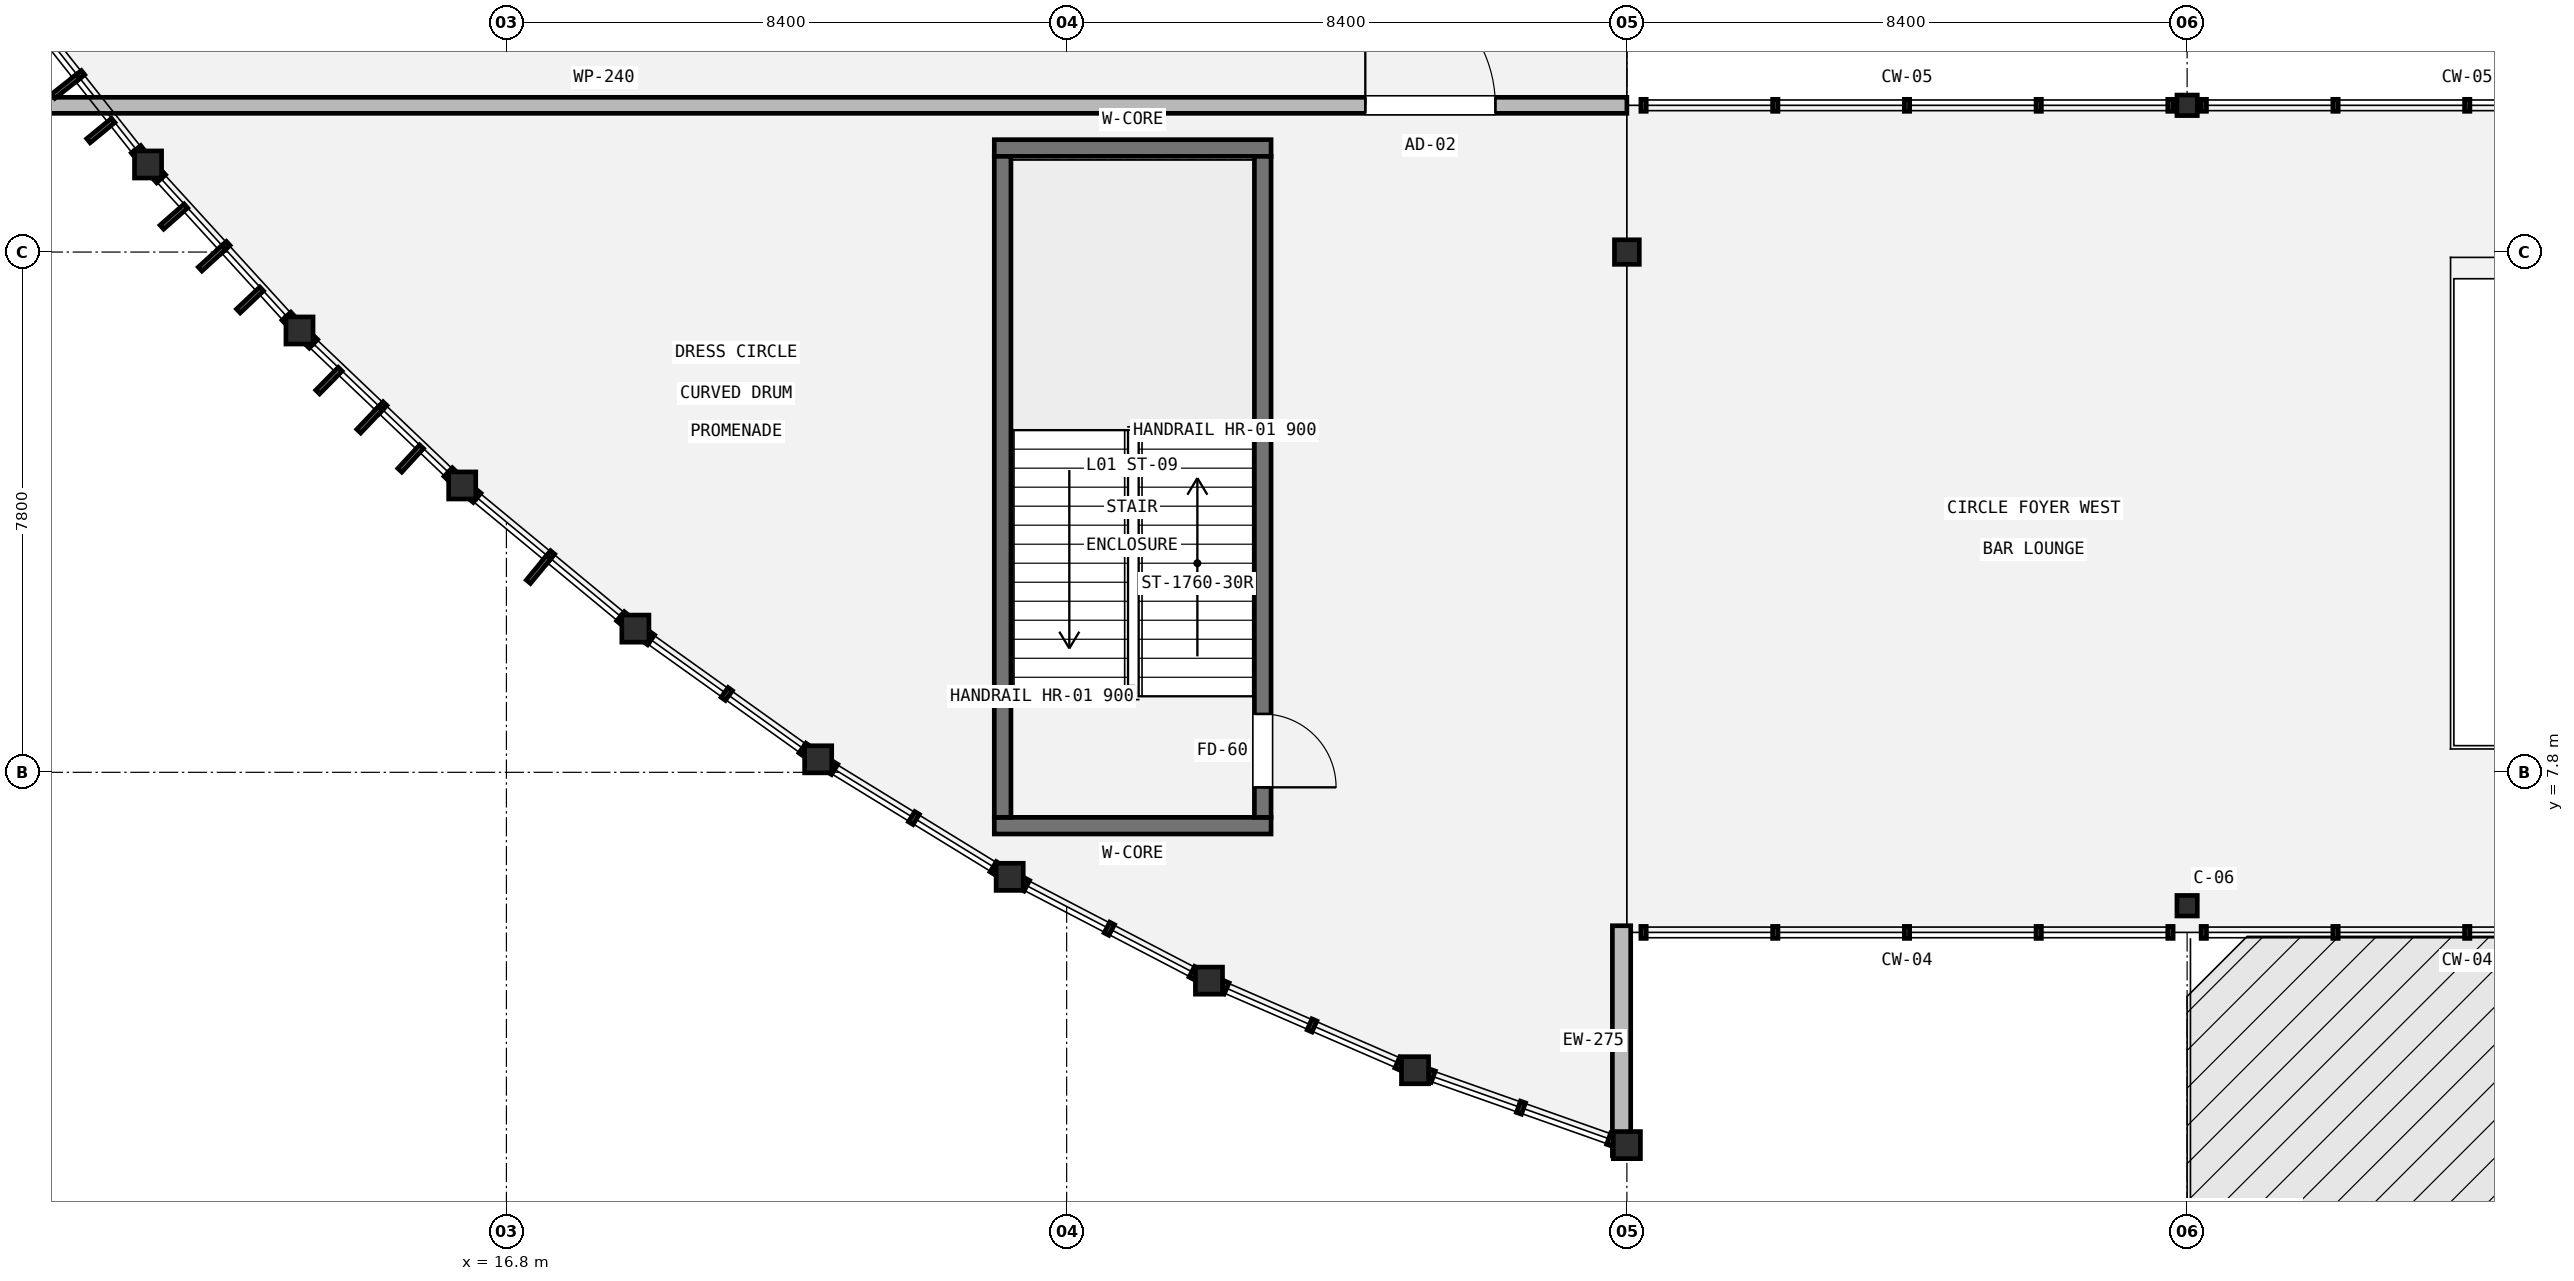
"""IFC4 building model, lengths in metres.
Left out: names, types, materials, properties, quantities, classifications, styles, units other than length and angle.
Written with IfcOpenShell. Run it as: python <this file> out.ifc"""

import sys

from ifc_helpers import new_model, si_unit, direction, frame, frame_2d, origin, origin_2d, place, context, subcontext, project, spatial, rectangle, hollow_circle, i_section, extrude, element, fill, save


model = new_model("IFC4")
c1 = context("Model", 3, precision=1e-05, world=origin(), true_north=direction((0.0, 1.0)))
c2 = subcontext(c1, "Body", "Model", "MODEL_VIEW")
j1 = project(units=[si_unit("LENGTHUNIT", "METRE"), si_unit("PLANEANGLEUNIT", "RADIAN")], contexts=[c1])
p1 = place(None, origin())
s1 = spatial("IfcSite", under=j1, at=p1, CompositionType="ELEMENT")
p2 = place(p1, origin())
s2 = spatial("IfcBuilding", under=s1, at=p2, CompositionType="ELEMENT")
p3 = place(p2, frame((0.0, 0.0, 5.4)))
s3 = spatial("IfcBuildingStorey", under=s2, at=p3, CompositionType="ELEMENT", Elevation=5.4)
p4 = place(p3, frame((33.6, 15.6, 0.0), z_axis=(0.0, 0.0, 1.0), x_axis=(1.0, 0.0, 0.0)))
e1 = element("IfcColumn", 1, at=p4, inside=s3, PredefinedType="COLUMN", context=c2, shape_type="SweptSolid", body=[
    extrude(i_section(OverallWidth=0.373, OverallDepth=0.368, WebThickness=0.014, FlangeThickness=0.024, FilletRadius=0.015, at=origin_2d()), origin(), (0.0, 0.0, 1.0), 4.8),
])
for number, where, z_axis, x_axis in (
    (2, (11.427, 16.913, 0.0), (0.0, 0.0, 1.0), (1.0, 0.0, 0.0)),
    (3, (13.698, 14.424, 0.0), (0.0, 0.0, 1.0), (1.0, 0.0, 0.0)),
    (4, (16.137, 12.101, 0.0), (0.0, 0.0, 1.0), (1.0, 0.0, 0.0)),
    (5, (18.734, 9.954, 0.0), (0.0, 0.0, 1.0), (1.0, 0.0, 0.0)),
    (6, (21.474, 7.995, 0.0), (0.0, 0.0, 1.0), (1.0, 0.0, 0.0)),
    (7, (24.346, 6.233, 0.0), (0.0, 0.0, 1.0), (1.0, 0.0, 0.0)),
    (8, (27.334, 4.677, 0.0), (0.0, 0.0, 1.0), (1.0, 0.0, 0.0)),
    (9, (30.424, 3.334, 0.0), (0.0, 0.0, 1.0), (1.0, 0.0, 0.0)),
    (10, (33.6, 2.211, 0.0), (0.0, 0.0, 1.0), (1.0, 0.0, 0.0)),
):
    element("IfcColumn", number, at=place(p3, frame(where, z_axis=z_axis, x_axis=x_axis)), inside=s3, PredefinedType="COLUMN", context=c2, shape_type="SweptSolid", body=[
        extrude(hollow_circle(Radius=0.203, WallThickness=0.016, at=origin_2d()), origin(), (0.0, 0.0, 1.0), 4.8),
    ])
for number, where, z_axis, x_axis in (
    (11, (42.0, 5.8, 0.0), (0.0, 0.0, 1.0), (1.0, 0.0, 0.0)),
    (12, (42.0, 17.8, 0.0), (0.0, 0.0, 1.0), (1.0, 0.0, 0.0)),
):
    element("IfcColumn", number, at=place(p3, frame(where, z_axis=z_axis, x_axis=x_axis)), inside=s3, PredefinedType="COLUMN", context=c2, shape_type="SweptSolid", body=[
        extrude(i_section(OverallWidth=0.305, OverallDepth=0.308, WebThickness=0.01, FlangeThickness=0.015, FilletRadius=0.015, at=origin_2d()), origin(), (0.0, 0.0, 1.0), 4.8),
    ])
p5 = place(p3, frame((33.52, 2.05, 0.0), z_axis=(0.0, 0.0, 1.0), x_axis=(0.0, 1.0, 0.0)))
e13 = element("IfcWall", 13, at=p5, inside=s3, PredefinedType="STANDARD", context=c2, shape_type="SweptSolid", body=[
    extrude(rectangle(XDim=3.45, YDim=0.275, at=frame_2d((1.725, 0.0))), origin(), (0.0, 0.0, 1.0), 4.172),
])
for number, where, z_axis, x_axis in (
    (14, (28.265, 7.0, 0.0), (0.0, 0.0, 1.0), (-1.0, 0.0, 0.0)),
    (15, (24.115, 17.16, 0.0), (0.0, 0.0, 1.0), (1.0, 0.0, 0.0)),
):
    element("IfcWall", number, at=place(p3, frame(where, z_axis=z_axis, x_axis=x_axis)), inside=s3, PredefinedType="SHEAR", context=c2, shape_type="SweptSolid", body=[
        extrude(rectangle(XDim=4.15, YDim=0.25, at=frame_2d((2.075, 0.0))), origin(), (0.0, 0.0, 1.0), 4.58),
    ])
p6 = place(p3, frame((24.24, 7.125, 0.0), z_axis=(0.0, 0.0, 1.0), x_axis=(0.0, 1.0, 0.0)))
e16 = element("IfcWall", 16, at=p6, inside=s3, PredefinedType="SHEAR", context=c2, shape_type="SweptSolid", body=[
    extrude(rectangle(XDim=9.91, YDim=0.25, at=frame_2d((4.955, 0.0))), origin(), (0.0, 0.0, 1.0), 4.58),
])
p7 = place(p3, frame((28.14, 17.035, 0.0), z_axis=(0.0, 0.0, 1.0), x_axis=(0.0, -1.0, 0.0)))
e17 = element("IfcWall", 17, at=p7, inside=s3, PredefinedType="SHEAR", context=c2, shape_type="SweptSolid", body=[
    extrude(rectangle(XDim=9.91, YDim=0.25, at=frame_2d((4.955, 0.0))), origin(), (0.0, 0.0, 1.0), 4.58),
])
p8 = place(p7, frame((8.36, 0.0, 0.0)))
e18 = element("IfcOpeningElement", 18, at=p8, cuts=e17, PredefinedType="OPENING", context=c2, shape_type="SweptSolid", body=[
    extrude(rectangle(XDim=1.1, YDim=2.15, at=frame_2d((0.55, 1.075))), frame((0.0, 0.135, 0.0), z_axis=(0.0, -1.0, 0.0), x_axis=(1.0, 0.0, 0.0)), (0.0, 0.0, 1.0), 0.27),
])
p9 = place(p3, frame((7.0, 17.8, 0.0), z_axis=(0.0, 0.0, 1.0), x_axis=(1.0, 0.0, 0.0)))
e19 = element("IfcWall", 19, at=p9, inside=s3, PredefinedType="PARTITIONING", context=c2, shape_type="SweptSolid", body=[
    extrude(rectangle(XDim=26.6, YDim=0.24, at=frame_2d((13.3, 0.0))), origin(), (0.0, 0.0, 1.0), 4.033),
])
p10 = place(p9, frame((22.678, 0.0, 0.0)))
e20 = element("IfcOpeningElement", 20, at=p10, cuts=e19, PredefinedType="OPENING", context=c2, shape_type="SweptSolid", body=[
    extrude(rectangle(XDim=1.95, YDim=2.35, at=frame_2d((0.975, 1.175))), frame((0.0, 0.13, 0.0), z_axis=(0.0, -1.0, 0.0), x_axis=(1.0, 0.0, 0.0)), (0.0, 0.0, 1.0), 0.26),
])
p11 = place(p8, origin())
e21 = element("IfcDoor", 21, at=p11, inside=s3, OperationType="SINGLE_SWING_RIGHT", PredefinedType="DOOR", context=c2, shape_type="SweptSolid", body=[
    extrude(rectangle(XDim=1.1, YDim=2.15, at=frame_2d((0.55, 1.075))), frame((0.0, 0.025, 0.0), z_axis=(0.0, -1.0, 0.0), x_axis=(1.0, 0.0, 0.0)), (0.0, 0.0, 1.0), 0.05),
])
fill(e18, e21)
p12 = place(p10, origin())
e22 = element("IfcDoor", 22, at=p12, inside=s3, OperationType="SINGLE_SWING_LEFT", PredefinedType="DOOR", context=c2, shape_type="SweptSolid", body=[
    extrude(rectangle(XDim=1.95, YDim=2.35, at=frame_2d((0.975, 1.175))), frame((0.0, 0.025, 0.0), z_axis=(0.0, -1.0, 0.0), x_axis=(1.0, 0.0, 0.0)), (0.0, 0.0, 1.0), 0.05),
])
fill(e20, e22)
save(model, sys.argv[1])
